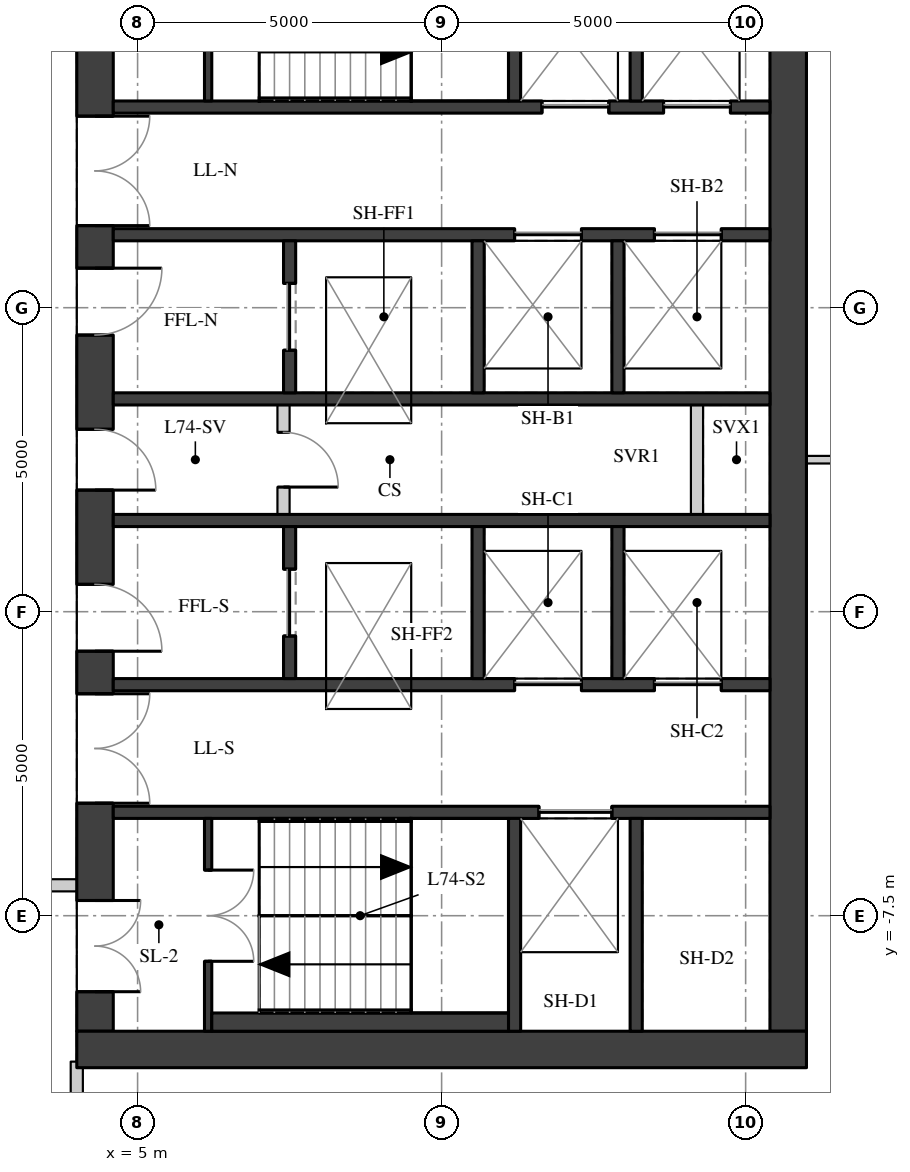
"""IFC4 building model, lengths in metres.
Left out: names, types, materials, properties, quantities, classifications, styles, units other than length and angle.
Written with IfcOpenShell. Run it as: python <this file> out.ifc"""

import sys

from ifc_helpers import new_model, si_unit, direction, frame, frame_2d, origin, place, context, subcontext, project, spatial, rectangle, extrude, element, fill, save


model = new_model("IFC4")
c1 = context("Model", 3, precision=1e-05, world=origin(), true_north=direction((0.0, 1.0)))
c2 = subcontext(c1, "Body", "Model", "MODEL_VIEW")
j1 = project(units=[si_unit("LENGTHUNIT", "METRE"), si_unit("PLANEANGLEUNIT", "RADIAN")], contexts=[c1])
p1 = place(None, origin())
s1 = spatial("IfcSite", under=j1, at=p1, CompositionType="ELEMENT")
p2 = place(p1, origin())
s2 = spatial("IfcBuilding", under=s1, at=p2, CompositionType="ELEMENT")
p3 = place(p2, frame((0.0, 0.0, 259.7)))
s3 = spatial("IfcBuildingStorey", under=s2, at=p3, CompositionType="ELEMENT", Elevation=259.7)
p4 = place(p3, frame((4.3, -9.4, 0.0), z_axis=(0.0, 0.0, 1.0), x_axis=(0.0, 1.0, 0.0)))
e1 = element("IfcWall", 1, at=p4, inside=s3, PredefinedType="SHEAR", context=c2, shape_type="SweptSolid", body=[
    extrude(rectangle(XDim=18.8, YDim=0.6, at=frame_2d((9.4, 0.0))), origin(), (0.0, 0.0, 1.0), 4.15),
])
p5 = place(p4, frame((0.65, 0.0, 0.0)))
e2 = element("IfcOpeningElement", 2, at=p5, cuts=e1, PredefinedType="OPENING", context=c2, shape_type="SweptSolid", body=[
    extrude(rectangle(XDim=1.5, YDim=2.1, at=frame_2d((0.75, 1.05))), frame((0.0, 0.31, 0.0), z_axis=(0.0, -1.0, 0.0), x_axis=(1.0, 0.0, 0.0)), (0.0, 0.0, 1.0), 0.62),
])
p6 = place(p4, frame((3.75, 0.0, 0.0)))
e3 = element("IfcOpeningElement", 3, at=p6, cuts=e1, PredefinedType="OPENING", context=c2, shape_type="SweptSolid", body=[
    extrude(rectangle(XDim=1.8, YDim=2.1, at=frame_2d((0.9, 1.05))), frame((0.0, 0.31, 0.0), z_axis=(0.0, -1.0, 0.0), x_axis=(1.0, 0.0, 0.0)), (0.0, 0.0, 1.0), 0.62),
])
p7 = place(p4, frame((6.25, 0.0, 0.0)))
e4 = element("IfcOpeningElement", 4, at=p7, cuts=e1, PredefinedType="OPENING", context=c2, shape_type="SweptSolid", body=[
    extrude(rectangle(XDim=1.1, YDim=2.1, at=frame_2d((0.55, 1.05))), frame((0.0, 0.31, 0.0), z_axis=(0.0, -1.0, 0.0), x_axis=(1.0, 0.0, 0.0)), (0.0, 0.0, 1.0), 0.62),
])
p8 = place(p4, frame((8.9, 0.0, 0.0)))
e5 = element("IfcOpeningElement", 5, at=p8, cuts=e1, PredefinedType="OPENING", context=c2, shape_type="SweptSolid", body=[
    extrude(rectangle(XDim=1.0, YDim=2.1, at=frame_2d((0.5, 1.05))), frame((0.0, 0.31, 0.0), z_axis=(0.0, -1.0, 0.0), x_axis=(1.0, 0.0, 0.0)), (0.0, 0.0, 1.0), 0.62),
])
p9 = place(p4, frame((11.45, 0.0, 0.0)))
e6 = element("IfcOpeningElement", 6, at=p9, cuts=e1, PredefinedType="OPENING", context=c2, shape_type="SweptSolid", body=[
    extrude(rectangle(XDim=1.1, YDim=2.1, at=frame_2d((0.55, 1.05))), frame((0.0, 0.31, 0.0), z_axis=(0.0, -1.0, 0.0), x_axis=(1.0, 0.0, 0.0)), (0.0, 0.0, 1.0), 0.62),
])
p10 = place(p4, frame((13.25, 0.0, 0.0)))
e7 = element("IfcOpeningElement", 7, at=p10, cuts=e1, PredefinedType="OPENING", context=c2, shape_type="SweptSolid", body=[
    extrude(rectangle(XDim=1.8, YDim=2.1, at=frame_2d((0.9, 1.05))), frame((0.0, 0.31, 0.0), z_axis=(0.0, -1.0, 0.0), x_axis=(1.0, 0.0, 0.0)), (0.0, 0.0, 1.0), 0.62),
])
p11 = place(p4, frame((16.65, 0.0, 0.0)))
e8 = element("IfcOpeningElement", 8, at=p11, cuts=e1, PredefinedType="OPENING", context=c2, shape_type="SweptSolid", body=[
    extrude(rectangle(XDim=1.5, YDim=2.1, at=frame_2d((0.75, 1.05))), frame((0.0, 0.31, 0.0), z_axis=(0.0, -1.0, 0.0), x_axis=(1.0, 0.0, 0.0)), (0.0, 0.0, 1.0), 0.62),
])
p12 = place(p3, frame((15.7, -9.4, 0.0), z_axis=(0.0, 0.0, 1.0), x_axis=(0.0, 1.0, 0.0)))
e9 = element("IfcWall", 9, at=p12, inside=s3, PredefinedType="SHEAR", context=c2, shape_type="SweptSolid", body=[
    extrude(rectangle(XDim=18.8, YDim=0.6, at=frame_2d((9.4, 0.0))), origin(), (0.0, 0.0, 1.0), 4.15),
])
p13 = place(p3, frame((4.0, -9.7, 0.0), z_axis=(0.0, 0.0, 1.0), x_axis=(1.0, 0.0, 0.0)))
e10 = element("IfcWall", 10, at=p13, inside=s3, PredefinedType="SHEAR", context=c2, shape_type="SweptSolid", body=[
    extrude(rectangle(XDim=12.0, YDim=0.6, at=frame_2d((6.0, 0.0))), origin(), (0.0, 0.0, 1.0), 4.15),
])
p14 = place(p3, frame((4.6, 5.8, 0.0), z_axis=(0.0, 0.0, 1.0), x_axis=(1.0, 0.0, 0.0)))
e11 = element("IfcWall", 11, at=p14, inside=s3, PredefinedType="SHEAR", context=c2, shape_type="SweptSolid", body=[
    extrude(rectangle(XDim=10.8, YDim=0.2, at=frame_2d((5.4, 0.0))), origin(), (0.0, 0.0, 1.0), 4.15),
])
p15 = place(p14, frame((7.05, 0.0, 0.0)))
e12 = element("IfcOpeningElement", 12, at=p15, cuts=e11, PredefinedType="OPENING", context=c2, shape_type="SweptSolid", body=[
    extrude(rectangle(XDim=1.1, YDim=2.1, at=frame_2d((0.55, 1.05))), frame((0.0, 0.11, 0.0), z_axis=(0.0, -1.0, 0.0), x_axis=(1.0, 0.0, 0.0)), (0.0, 0.0, 1.0), 0.22),
])
p16 = place(p14, frame((9.05, 0.0, 0.0)))
e13 = element("IfcOpeningElement", 13, at=p16, cuts=e11, PredefinedType="OPENING", context=c2, shape_type="SweptSolid", body=[
    extrude(rectangle(XDim=1.1, YDim=2.1, at=frame_2d((0.55, 1.05))), frame((0.0, 0.11, 0.0), z_axis=(0.0, -1.0, 0.0), x_axis=(1.0, 0.0, 0.0)), (0.0, 0.0, 1.0), 0.22),
])
p17 = place(p3, frame((4.6, 3.7, 0.0), z_axis=(0.0, 0.0, 1.0), x_axis=(1.0, 0.0, 0.0)))
e14 = element("IfcWall", 14, at=p17, inside=s3, PredefinedType="SHEAR", context=c2, shape_type="SweptSolid", body=[
    extrude(rectangle(XDim=10.8, YDim=0.2, at=frame_2d((5.4, 0.0))), origin(), (0.0, 0.0, 1.0), 4.15),
])
p18 = place(p17, frame((6.6, 0.0, 0.0)))
e15 = element("IfcOpeningElement", 15, at=p18, cuts=e14, PredefinedType="OPENING", context=c2, shape_type="SweptSolid", body=[
    extrude(rectangle(XDim=1.1, YDim=2.1, at=frame_2d((0.55, 1.05))), frame((0.0, 0.11, 0.0), z_axis=(0.0, -1.0, 0.0), x_axis=(1.0, 0.0, 0.0)), (0.0, 0.0, 1.0), 0.22),
])
p19 = place(p17, frame((8.9, 0.0, 0.0)))
e16 = element("IfcOpeningElement", 16, at=p19, cuts=e14, PredefinedType="OPENING", context=c2, shape_type="SweptSolid", body=[
    extrude(rectangle(XDim=1.1, YDim=2.1, at=frame_2d((0.55, 1.05))), frame((0.0, 0.11, 0.0), z_axis=(0.0, -1.0, 0.0), x_axis=(1.0, 0.0, 0.0)), (0.0, 0.0, 1.0), 0.22),
])
for number, where, z_axis, x_axis in (
    (17, (4.6, 1.0, 0.0), (0.0, 0.0, 1.0), (1.0, 0.0, 0.0)),
    (18, (4.6, -1.0, 0.0), (0.0, 0.0, 1.0), (1.0, 0.0, 0.0)),
):
    element("IfcWall", number, at=place(p3, frame(where, z_axis=z_axis, x_axis=x_axis)), inside=s3, PredefinedType="SHEAR", context=c2, shape_type="SweptSolid", body=[
        extrude(rectangle(XDim=10.8, YDim=0.2, at=frame_2d((5.4, 0.0))), origin(), (0.0, 0.0, 1.0), 4.15),
    ])
p20 = place(p3, frame((4.6, -3.7, 0.0), z_axis=(0.0, 0.0, 1.0), x_axis=(1.0, 0.0, 0.0)))
e19 = element("IfcWall", 19, at=p20, inside=s3, PredefinedType="SHEAR", context=c2, shape_type="SweptSolid", body=[
    extrude(rectangle(XDim=10.8, YDim=0.2, at=frame_2d((5.4, 0.0))), origin(), (0.0, 0.0, 1.0), 4.15),
])
p21 = place(p20, frame((6.6, 0.0, 0.0)))
e20 = element("IfcOpeningElement", 20, at=p21, cuts=e19, PredefinedType="OPENING", context=c2, shape_type="SweptSolid", body=[
    extrude(rectangle(XDim=1.1, YDim=2.1, at=frame_2d((0.55, 1.05))), frame((0.0, 0.11, 0.0), z_axis=(0.0, -1.0, 0.0), x_axis=(1.0, 0.0, 0.0)), (0.0, 0.0, 1.0), 0.22),
])
p22 = place(p20, frame((8.9, 0.0, 0.0)))
e21 = element("IfcOpeningElement", 21, at=p22, cuts=e19, PredefinedType="OPENING", context=c2, shape_type="SweptSolid", body=[
    extrude(rectangle(XDim=1.1, YDim=2.1, at=frame_2d((0.55, 1.05))), frame((0.0, 0.11, 0.0), z_axis=(0.0, -1.0, 0.0), x_axis=(1.0, 0.0, 0.0)), (0.0, 0.0, 1.0), 0.22),
])
p23 = place(p3, frame((4.6, -5.8, 0.0), z_axis=(0.0, 0.0, 1.0), x_axis=(1.0, 0.0, 0.0)))
e22 = element("IfcWall", 22, at=p23, inside=s3, PredefinedType="SHEAR", context=c2, shape_type="SweptSolid", body=[
    extrude(rectangle(XDim=10.8, YDim=0.2, at=frame_2d((5.4, 0.0))), origin(), (0.0, 0.0, 1.0), 4.15),
])
p24 = place(p23, frame((7.0, 0.0, 0.0)))
e23 = element("IfcOpeningElement", 23, at=p24, cuts=e22, PredefinedType="OPENING", context=c2, shape_type="SweptSolid", body=[
    extrude(rectangle(XDim=1.2, YDim=2.1, at=frame_2d((0.6, 1.05))), frame((0.0, 0.11, 0.0), z_axis=(0.0, -1.0, 0.0), x_axis=(1.0, 0.0, 0.0)), (0.0, 0.0, 1.0), 0.22),
])
for number, where, z_axis, x_axis in (
    (24, (11.2, 5.9, 0.0), (0.0, 0.0, 1.0), (0.0, 1.0, 0.0)),
    (25, (11.2, -9.4, 0.0), (0.0, 0.0, 1.0), (0.0, 1.0, 0.0)),
    (26, (13.2, 5.9, 0.0), (0.0, 0.0, 1.0), (0.0, 1.0, 0.0)),
    (27, (13.2, -9.4, 0.0), (0.0, 0.0, 1.0), (0.0, 1.0, 0.0)),
):
    element("IfcWall", number, at=place(p3, frame(where, z_axis=z_axis, x_axis=x_axis)), inside=s3, PredefinedType="SHEAR", context=c2, shape_type="SweptSolid", body=[
        extrude(rectangle(XDim=3.5, YDim=0.2, at=frame_2d((1.75, 0.0))), origin(), (0.0, 0.0, 1.0), 4.15),
    ])
p25 = place(p3, frame((7.5, 1.1, 0.0), z_axis=(0.0, 0.0, 1.0), x_axis=(0.0, 1.0, 0.0)))
e28 = element("IfcWall", 28, at=p25, inside=s3, PredefinedType="SHEAR", context=c2, shape_type="SweptSolid", body=[
    extrude(rectangle(XDim=2.5, YDim=0.2, at=frame_2d((1.25, 0.0))), origin(), (0.0, 0.0, 1.0), 4.15),
])
p26 = place(p25, frame((0.7, 0.0, 0.0)))
e29 = element("IfcOpeningElement", 29, at=p26, cuts=e28, PredefinedType="OPENING", context=c2, shape_type="SweptSolid", body=[
    extrude(rectangle(XDim=1.1, YDim=2.1, at=frame_2d((0.55, 1.05))), frame((0.0, 0.11, 0.0), z_axis=(0.0, -1.0, 0.0), x_axis=(1.0, 0.0, 0.0)), (0.0, 0.0, 1.0), 0.22),
])
p27 = place(p3, frame((7.5, -3.6, 0.0), z_axis=(0.0, 0.0, 1.0), x_axis=(0.0, 1.0, 0.0)))
e30 = element("IfcWall", 30, at=p27, inside=s3, PredefinedType="SHEAR", context=c2, shape_type="SweptSolid", body=[
    extrude(rectangle(XDim=2.5, YDim=0.2, at=frame_2d((1.25, 0.0))), origin(), (0.0, 0.0, 1.0), 4.15),
])
p28 = place(p27, frame((0.7, 0.0, 0.0)))
e31 = element("IfcOpeningElement", 31, at=p28, cuts=e30, PredefinedType="OPENING", context=c2, shape_type="SweptSolid", body=[
    extrude(rectangle(XDim=1.1, YDim=2.1, at=frame_2d((0.55, 1.05))), frame((0.0, 0.11, 0.0), z_axis=(0.0, -1.0, 0.0), x_axis=(1.0, 0.0, 0.0)), (0.0, 0.0, 1.0), 0.22),
])
for number, where, z_axis, x_axis in (
    (32, (10.6, 1.1, 0.0), (0.0, 0.0, 1.0), (0.0, 1.0, 0.0)),
    (33, (10.6, -3.6, 0.0), (0.0, 0.0, 1.0), (0.0, 1.0, 0.0)),
    (34, (12.9, 1.1, 0.0), (0.0, 0.0, 1.0), (0.0, 1.0, 0.0)),
    (35, (12.9, -3.6, 0.0), (0.0, 0.0, 1.0), (0.0, 1.0, 0.0)),
):
    element("IfcWall", number, at=place(p3, frame(where, z_axis=z_axis, x_axis=x_axis)), inside=s3, PredefinedType="SHEAR", context=c2, shape_type="SweptSolid", body=[
        extrude(rectangle(XDim=2.5, YDim=0.2, at=frame_2d((1.25, 0.0))), origin(), (0.0, 0.0, 1.0), 4.15),
    ])
p29 = place(p3, frame((6.16, 5.9, 0.0), z_axis=(0.0, 0.0, 1.0), x_axis=(0.0, 1.0, 0.0)))
e36 = element("IfcWall", 36, at=p29, inside=s3, PredefinedType="SHEAR", context=c2, shape_type="SweptSolid", body=[
    extrude(rectangle(XDim=3.5, YDim=0.12, at=frame_2d((1.75, 0.0))), origin(), (0.0, 0.0, 1.0), 4.15),
])
p30 = place(p29, frame((0.85, 0.0, 0.0)))
e37 = element("IfcOpeningElement", 37, at=p30, cuts=e36, PredefinedType="OPENING", context=c2, shape_type="SweptSolid", body=[
    extrude(rectangle(XDim=1.5, YDim=2.1, at=frame_2d((0.75, 1.05))), frame((0.0, 0.07, 0.0), z_axis=(0.0, -1.0, 0.0), x_axis=(1.0, 0.0, 0.0)), (0.0, 0.0, 1.0), 0.14),
])
p31 = place(p3, frame((6.16, -9.4, 0.0), z_axis=(0.0, 0.0, 1.0), x_axis=(0.0, 1.0, 0.0)))
e38 = element("IfcWall", 38, at=p31, inside=s3, PredefinedType="SHEAR", context=c2, shape_type="SweptSolid", body=[
    extrude(rectangle(XDim=3.5, YDim=0.12, at=frame_2d((1.75, 0.0))), origin(), (0.0, 0.0, 1.0), 4.15),
])
p32 = place(p31, frame((1.15, 0.0, 0.0)))
e39 = element("IfcOpeningElement", 39, at=p32, cuts=e38, PredefinedType="OPENING", context=c2, shape_type="SweptSolid", body=[
    extrude(rectangle(XDim=1.5, YDim=2.1, at=frame_2d((0.75, 1.05))), frame((0.0, 0.07, 0.0), z_axis=(0.0, -1.0, 0.0), x_axis=(1.0, 0.0, 0.0)), (0.0, 0.0, 1.0), 0.14),
])
p33 = place(p3, frame((7.4, -0.9, 0.0), z_axis=(0.0, 0.0, 1.0), x_axis=(0.0, 1.0, 0.0)))
e40 = element("IfcWall", 40, at=p33, inside=s3, PredefinedType="PARTITIONING", context=c2, shape_type="SweptSolid", body=[
    extrude(rectangle(XDim=1.8, YDim=0.2, at=frame_2d((0.9, 0.0))), origin(), (0.0, 0.0, 1.0), 4.15),
])
p34 = place(p33, frame((0.45, 0.0, 0.0)))
e41 = element("IfcOpeningElement", 41, at=p34, cuts=e40, PredefinedType="OPENING", context=c2, shape_type="SweptSolid", body=[
    extrude(rectangle(XDim=0.9, YDim=2.1, at=frame_2d((0.45, 1.05))), frame((0.0, 0.11, 0.0), z_axis=(0.0, -1.0, 0.0), x_axis=(1.0, 0.0, 0.0)), (0.0, 0.0, 1.0), 0.22),
])
p35 = place(p3, frame((14.2, -0.9, 0.0), z_axis=(0.0, 0.0, 1.0), x_axis=(0.0, 1.0, 0.0)))
e42 = element("IfcWall", 42, at=p35, inside=s3, PredefinedType="PARTITIONING", context=c2, shape_type="SweptSolid", body=[
    extrude(rectangle(XDim=1.8, YDim=0.2, at=frame_2d((0.9, 0.0))), origin(), (0.0, 0.0, 1.0), 4.15),
])
p36 = place(p3, frame((6.22, -9.25, 0.0), z_axis=(0.0, 0.0, 1.0), x_axis=(1.0, 0.0, 0.0)))
e43 = element("IfcWall", 43, at=p36, inside=s3, PredefinedType="PARTITIONING", context=c2, shape_type="SweptSolid", body=[
    extrude(rectangle(XDim=4.88, YDim=0.3, at=frame_2d((2.44, 0.0))), origin(), (0.0, 0.0, 1.0), 4.15),
])
p37 = place(p3, frame((-9.4, -7.0, 0.0), z_axis=(0.0, 0.0, 1.0), x_axis=(1.0, 0.0, 0.0)))
e44 = element("IfcWall", 44, at=p37, inside=s3, PredefinedType="PARTITIONING", context=c2, shape_type="SweptSolid", body=[
    extrude(rectangle(XDim=13.402, YDim=0.2, at=frame_2d((6.701, 0.0))), origin(), (0.0, 0.0, 1.0), 3.6),
])
p38 = place(p37, frame((9.001, 0.0, 0.0)))
e45 = element("IfcOpeningElement", 45, at=p38, cuts=e44, PredefinedType="OPENING", context=c2, shape_type="SweptSolid", body=[
    extrude(rectangle(XDim=1.8, YDim=2.1, at=frame_2d((0.9, 1.05))), frame((0.0, 0.11, 0.0), z_axis=(0.0, -1.0, 0.0), x_axis=(1.0, 0.0, 0.0)), (0.0, 0.0, 1.0), 0.22),
])
p39 = place(p3, frame((15.998, 0.0, 0.0), z_axis=(0.0, 0.0, 1.0), x_axis=(1.0, 0.0, 0.0)))
e46 = element("IfcWall", 46, at=p39, inside=s3, PredefinedType="PARTITIONING", context=c2, shape_type="SweptSolid", body=[
    extrude(rectangle(XDim=8.229, YDim=0.125, at=frame_2d((4.114, 0.0))), origin(), (0.0, 0.0, 1.0), 3.7),
])
p40 = place(p3, frame((4.0, -13.9, 0.0), z_axis=(0.0, 0.0, 1.0), x_axis=(0.0, 1.0, 0.0)))
e47 = element("IfcWall", 47, at=p40, inside=s3, PredefinedType="PARTITIONING", context=c2, shape_type="SweptSolid", body=[
    extrude(rectangle(XDim=4.0, YDim=0.2, at=frame_2d((2.0, 0.0))), origin(), (0.0, 0.0, 1.0), 4.15),
])
p41 = place(p5, origin())
e48 = element("IfcDoor", 48, at=p41, inside=s3, OperationType="DOUBLE_DOOR_SINGLE_SWING", PredefinedType="DOOR", context=c2, shape_type="SweptSolid", body=[
    extrude(rectangle(XDim=1.5, YDim=2.1, at=frame_2d((0.75, 1.05))), frame((0.0, 0.025, 0.0), z_axis=(0.0, -1.0, 0.0), x_axis=(1.0, 0.0, 0.0)), (0.0, 0.0, 1.0), 0.05),
])
fill(e2, e48)
p42 = place(p6, origin())
e49 = element("IfcDoor", 49, at=p42, inside=s3, OperationType="DOUBLE_DOOR_SINGLE_SWING", PredefinedType="DOOR", context=c2, shape_type="SweptSolid", body=[
    extrude(rectangle(XDim=1.8, YDim=2.1, at=frame_2d((0.9, 1.05))), frame((0.0, 0.025, 0.0), z_axis=(0.0, -1.0, 0.0), x_axis=(1.0, 0.0, 0.0)), (0.0, 0.0, 1.0), 0.05),
])
fill(e3, e49)
p43 = place(p7, origin())
e50 = element("IfcDoor", 50, at=p43, inside=s3, OperationType="SINGLE_SWING_RIGHT", PredefinedType="DOOR", context=c2, shape_type="SweptSolid", body=[
    extrude(rectangle(XDim=1.1, YDim=2.1, at=frame_2d((0.55, 1.05))), frame((0.0, 0.025, 0.0), z_axis=(0.0, -1.0, 0.0), x_axis=(1.0, 0.0, 0.0)), (0.0, 0.0, 1.0), 0.05),
])
fill(e4, e50)
p44 = place(p8, origin())
e51 = element("IfcDoor", 51, at=p44, inside=s3, OperationType="SINGLE_SWING_RIGHT", PredefinedType="DOOR", context=c2, shape_type="SweptSolid", body=[
    extrude(rectangle(XDim=1.0, YDim=2.1, at=frame_2d((0.5, 1.05))), frame((0.0, 0.025, 0.0), z_axis=(0.0, -1.0, 0.0), x_axis=(1.0, 0.0, 0.0)), (0.0, 0.0, 1.0), 0.05),
])
fill(e5, e51)
p45 = place(p9, origin())
e52 = element("IfcDoor", 52, at=p45, inside=s3, OperationType="SINGLE_SWING_LEFT", PredefinedType="DOOR", context=c2, shape_type="SweptSolid", body=[
    extrude(rectangle(XDim=1.1, YDim=2.1, at=frame_2d((0.55, 1.05))), frame((0.0, 0.025, 0.0), z_axis=(0.0, -1.0, 0.0), x_axis=(1.0, 0.0, 0.0)), (0.0, 0.0, 1.0), 0.05),
])
fill(e6, e52)
p46 = place(p10, origin())
e53 = element("IfcDoor", 53, at=p46, inside=s3, OperationType="DOUBLE_DOOR_SINGLE_SWING", PredefinedType="DOOR", context=c2, shape_type="SweptSolid", body=[
    extrude(rectangle(XDim=1.8, YDim=2.1, at=frame_2d((0.9, 1.05))), frame((0.0, 0.025, 0.0), z_axis=(0.0, -1.0, 0.0), x_axis=(1.0, 0.0, 0.0)), (0.0, 0.0, 1.0), 0.05),
])
fill(e7, e53)
p47 = place(p32, origin())
e54 = element("IfcDoor", 54, at=p47, inside=s3, OperationType="DOUBLE_DOOR_SINGLE_SWING", PredefinedType="DOOR", context=c2, shape_type="SweptSolid", body=[
    extrude(rectangle(XDim=1.5, YDim=2.1, at=frame_2d((0.75, 1.05))), frame((0.0, 0.025, 0.0), z_axis=(0.0, -1.0, 0.0), x_axis=(1.0, 0.0, 0.0)), (0.0, 0.0, 1.0), 0.05),
])
fill(e39, e54)
p48 = place(p15, origin())
e55 = element("IfcDoor", 55, at=p48, inside=s3, OperationType="DOUBLE_DOOR_SLIDING", PredefinedType="DOOR", context=c2, shape_type="SweptSolid", body=[
    extrude(rectangle(XDim=1.1, YDim=2.1, at=frame_2d((0.55, 1.05))), frame((0.0, 0.025, 0.0), z_axis=(0.0, -1.0, 0.0), x_axis=(1.0, 0.0, 0.0)), (0.0, 0.0, 1.0), 0.05),
])
fill(e12, e55)
p49 = place(p16, origin())
e56 = element("IfcDoor", 56, at=p49, inside=s3, OperationType="DOUBLE_DOOR_SLIDING", PredefinedType="DOOR", context=c2, shape_type="SweptSolid", body=[
    extrude(rectangle(XDim=1.1, YDim=2.1, at=frame_2d((0.55, 1.05))), frame((0.0, 0.025, 0.0), z_axis=(0.0, -1.0, 0.0), x_axis=(1.0, 0.0, 0.0)), (0.0, 0.0, 1.0), 0.05),
])
fill(e13, e56)
p50 = place(p18, origin())
e57 = element("IfcDoor", 57, at=p50, inside=s3, OperationType="DOUBLE_DOOR_SLIDING", PredefinedType="DOOR", context=c2, shape_type="SweptSolid", body=[
    extrude(rectangle(XDim=1.1, YDim=2.1, at=frame_2d((0.55, 1.05))), frame((0.0, 0.025, 0.0), z_axis=(0.0, -1.0, 0.0), x_axis=(1.0, 0.0, 0.0)), (0.0, 0.0, 1.0), 0.05),
])
fill(e15, e57)
p51 = place(p19, origin())
e58 = element("IfcDoor", 58, at=p51, inside=s3, OperationType="DOUBLE_DOOR_SLIDING", PredefinedType="DOOR", context=c2, shape_type="SweptSolid", body=[
    extrude(rectangle(XDim=1.1, YDim=2.1, at=frame_2d((0.55, 1.05))), frame((0.0, 0.025, 0.0), z_axis=(0.0, -1.0, 0.0), x_axis=(1.0, 0.0, 0.0)), (0.0, 0.0, 1.0), 0.05),
])
fill(e16, e58)
p52 = place(p21, origin())
e59 = element("IfcDoor", 59, at=p52, inside=s3, OperationType="DOUBLE_DOOR_SLIDING", PredefinedType="DOOR", context=c2, shape_type="SweptSolid", body=[
    extrude(rectangle(XDim=1.1, YDim=2.1, at=frame_2d((0.55, 1.05))), frame((0.0, 0.025, 0.0), z_axis=(0.0, -1.0, 0.0), x_axis=(1.0, 0.0, 0.0)), (0.0, 0.0, 1.0), 0.05),
])
fill(e20, e59)
p53 = place(p22, origin())
e60 = element("IfcDoor", 60, at=p53, inside=s3, OperationType="DOUBLE_DOOR_SLIDING", PredefinedType="DOOR", context=c2, shape_type="SweptSolid", body=[
    extrude(rectangle(XDim=1.1, YDim=2.1, at=frame_2d((0.55, 1.05))), frame((0.0, 0.025, 0.0), z_axis=(0.0, -1.0, 0.0), x_axis=(1.0, 0.0, 0.0)), (0.0, 0.0, 1.0), 0.05),
])
fill(e21, e60)
p54 = place(p24, origin())
e61 = element("IfcDoor", 61, at=p54, inside=s3, OperationType="DOUBLE_DOOR_SLIDING", PredefinedType="DOOR", context=c2, shape_type="SweptSolid", body=[
    extrude(rectangle(XDim=1.2, YDim=2.1, at=frame_2d((0.6, 1.05))), frame((0.0, 0.025, 0.0), z_axis=(0.0, -1.0, 0.0), x_axis=(1.0, 0.0, 0.0)), (0.0, 0.0, 1.0), 0.05),
])
fill(e23, e61)
p55 = place(p26, origin())
e62 = element("IfcDoor", 62, at=p55, inside=s3, OperationType="DOUBLE_DOOR_SLIDING", PredefinedType="DOOR", context=c2, shape_type="SweptSolid", body=[
    extrude(rectangle(XDim=1.1, YDim=2.1, at=frame_2d((0.55, 1.05))), frame((0.0, 0.025, 0.0), z_axis=(0.0, -1.0, 0.0), x_axis=(1.0, 0.0, 0.0)), (0.0, 0.0, 1.0), 0.05),
])
fill(e29, e62)
p56 = place(p28, origin())
e63 = element("IfcDoor", 63, at=p56, inside=s3, OperationType="DOUBLE_DOOR_SLIDING", PredefinedType="DOOR", context=c2, shape_type="SweptSolid", body=[
    extrude(rectangle(XDim=1.1, YDim=2.1, at=frame_2d((0.55, 1.05))), frame((0.0, 0.025, 0.0), z_axis=(0.0, -1.0, 0.0), x_axis=(1.0, 0.0, 0.0)), (0.0, 0.0, 1.0), 0.05),
])
fill(e31, e63)
p57 = place(p34, origin())
e64 = element("IfcDoor", 64, at=p57, inside=s3, OperationType="SINGLE_SWING_RIGHT", PredefinedType="DOOR", context=c2, shape_type="SweptSolid", body=[
    extrude(rectangle(XDim=0.9, YDim=2.1, at=frame_2d((0.45, 1.05))), frame((0.0, 0.025, 0.0), z_axis=(0.0, -1.0, 0.0), x_axis=(1.0, 0.0, 0.0)), (0.0, 0.0, 1.0), 0.05),
])
fill(e41, e64)
save(model, sys.argv[1])
